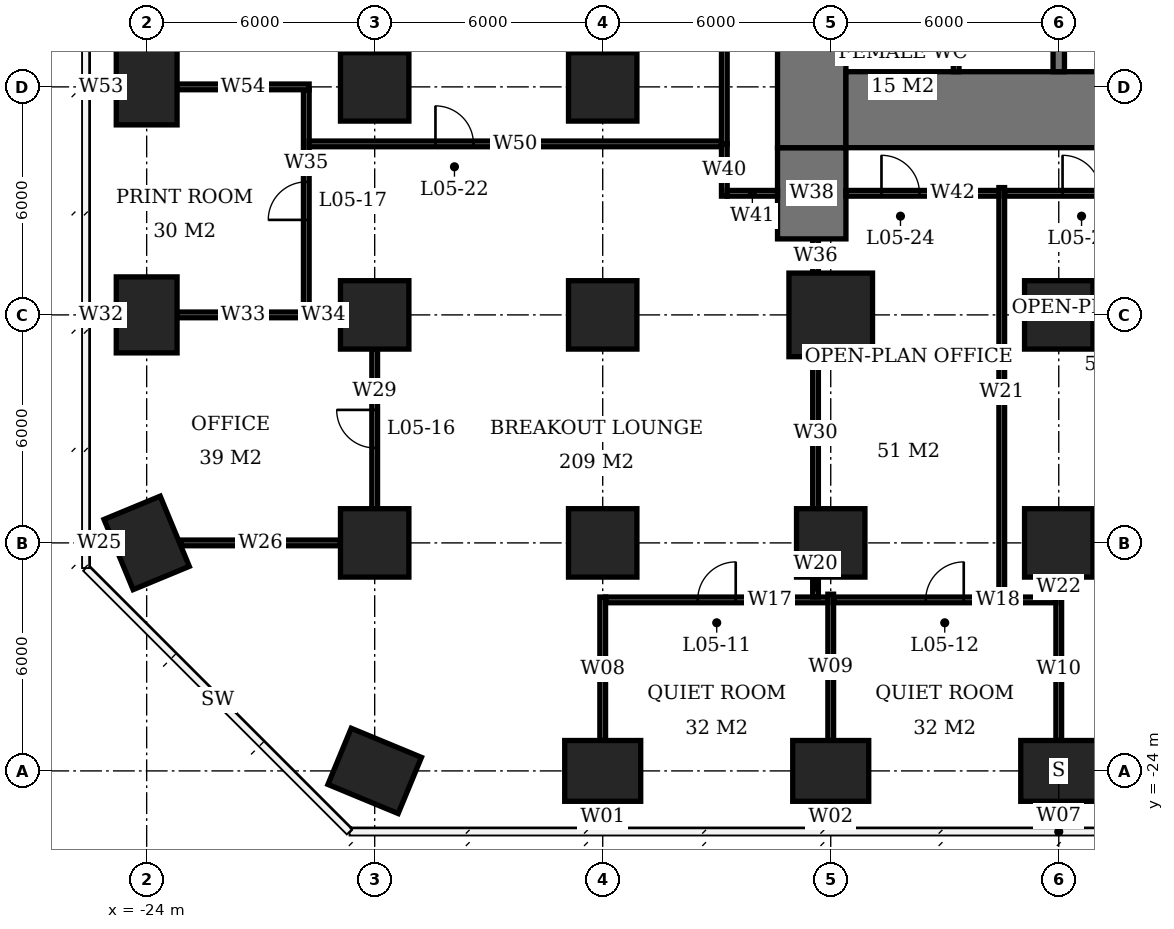
"""IFC4 building model, lengths in metres.
Left out: names, types, materials, properties, quantities, classifications, styles, units other than length and angle.
Written with IfcOpenShell. Run it as: python <this file> out.ifc"""

import sys

from ifc_helpers import new_model, si_unit, direction, frame, frame_2d, origin, origin_2d, place, context, subcontext, project, spatial, rectangle, extrude, element, fill, save


model = new_model("IFC4")
c1 = context("Model", 3, precision=1e-05, world=origin(), true_north=direction((0.0, 1.0)))
c2 = subcontext(c1, "Body", "Model", "MODEL_VIEW")
j1 = project(units=[si_unit("LENGTHUNIT", "METRE"), si_unit("PLANEANGLEUNIT", "RADIAN")], contexts=[c1])
p1 = place(None, origin())
s1 = spatial("IfcSite", under=j1, at=p1, CompositionType="ELEMENT")
p2 = place(p1, origin())
s2 = spatial("IfcBuilding", under=s1, at=p2, CompositionType="ELEMENT")
p3 = place(p2, frame((0.0, 0.0, 26.0)))
s3 = spatial("IfcBuildingStorey", under=s2, at=p3, CompositionType="ELEMENT", Elevation=26.0)
for number, where, z_axis, x_axis in (
    (1, (-24.0, -18.0, 0.0), (0.0, 0.0, 1.0), (-0.383, 0.924, 0.0)),
    (2, (-24.0, -12.0, 0.0), (0.0, 0.0, 1.0), (0.0, 1.0, 0.0)),
    (3, (-24.0, -6.0, 0.0), (0.0, 0.0, 1.0), (0.0, 1.0, 0.0)),
    (4, (-18.0, -24.0, 0.0), (0.0, 0.0, 1.0), (-0.924, 0.383, 0.0)),
):
    element("IfcColumn", number, at=place(p3, frame(where, z_axis=z_axis, x_axis=x_axis)), inside=s3, PredefinedType="COLUMN", context=c2, shape_type="SweptSolid", body=[
        extrude(rectangle(XDim=2.0, YDim=1.6, at=origin_2d()), origin(), (0.0, 0.0, 1.0), 3.9),
    ])
for number, where, z_axis, x_axis in (
    (5, (-18.0, -18.0, 0.0), (0.0, 0.0, 1.0), (1.0, 0.0, 0.0)),
    (6, (-18.0, -12.0, 0.0), (0.0, 0.0, 1.0), (1.0, 0.0, 0.0)),
    (7, (-18.0, -6.0, 0.0), (0.0, 0.0, 1.0), (1.0, 0.0, 0.0)),
):
    element("IfcColumn", number, at=place(p3, frame(where, z_axis=z_axis, x_axis=x_axis)), inside=s3, PredefinedType="COLUMN", context=c2, shape_type="SweptSolid", body=[
        extrude(rectangle(XDim=1.8, YDim=1.8, at=origin_2d()), origin(), (0.0, 0.0, 1.0), 3.9),
    ])
p4 = place(p3, frame((-12.0, -24.0, 0.0), z_axis=(0.0, 0.0, 1.0), x_axis=(1.0, 0.0, 0.0)))
e8 = element("IfcColumn", 8, at=p4, inside=s3, PredefinedType="COLUMN", context=c2, shape_type="SweptSolid", body=[
    extrude(rectangle(XDim=2.0, YDim=1.6, at=origin_2d()), origin(), (0.0, 0.0, 1.0), 3.9),
])
for number, where, z_axis, x_axis in (
    (9, (-12.0, -18.0, 0.0), (0.0, 0.0, 1.0), (1.0, 0.0, 0.0)),
    (10, (-12.0, -12.0, 0.0), (0.0, 0.0, 1.0), (1.0, 0.0, 0.0)),
    (11, (-12.0, -6.0, 0.0), (0.0, 0.0, 1.0), (1.0, 0.0, 0.0)),
):
    element("IfcColumn", number, at=place(p3, frame(where, z_axis=z_axis, x_axis=x_axis)), inside=s3, PredefinedType="COLUMN", context=c2, shape_type="SweptSolid", body=[
        extrude(rectangle(XDim=1.8, YDim=1.8, at=origin_2d()), origin(), (0.0, 0.0, 1.0), 3.9),
    ])
p5 = place(p3, frame((-6.0, -24.0, 0.0), z_axis=(0.0, 0.0, 1.0), x_axis=(1.0, 0.0, 0.0)))
e12 = element("IfcColumn", 12, at=p5, inside=s3, PredefinedType="COLUMN", context=c2, shape_type="SweptSolid", body=[
    extrude(rectangle(XDim=2.0, YDim=1.6, at=origin_2d()), origin(), (0.0, 0.0, 1.0), 3.9),
])
p6 = place(p3, frame((-6.0, -18.0, 0.0), z_axis=(0.0, 0.0, 1.0), x_axis=(1.0, 0.0, 0.0)))
e13 = element("IfcColumn", 13, at=p6, inside=s3, PredefinedType="COLUMN", context=c2, shape_type="SweptSolid", body=[
    extrude(rectangle(XDim=1.8, YDim=1.8, at=origin_2d()), origin(), (0.0, 0.0, 1.0), 3.9),
])
p7 = place(p3, frame((-6.0, -12.0, 0.0), z_axis=(0.0, 0.0, 1.0), x_axis=(1.0, 0.0, 0.0)))
e14 = element("IfcColumn", 14, at=p7, inside=s3, PredefinedType="COLUMN", context=c2, shape_type="SweptSolid", body=[
    extrude(rectangle(XDim=2.2, YDim=2.2, at=origin_2d()), origin(), (0.0, 0.0, 1.0), 3.9),
])
p8 = place(p3, frame((0.0, -24.0, 0.0), z_axis=(0.0, 0.0, 1.0), x_axis=(1.0, 0.0, 0.0)))
e15 = element("IfcColumn", 15, at=p8, inside=s3, PredefinedType="COLUMN", context=c2, shape_type="SweptSolid", body=[
    extrude(rectangle(XDim=2.0, YDim=1.6, at=origin_2d()), origin(), (0.0, 0.0, 1.0), 3.9),
])
for number, where, z_axis, x_axis in (
    (16, (0.0, -18.0, 0.0), (0.0, 0.0, 1.0), (1.0, 0.0, 0.0)),
    (17, (0.0, -12.0, 0.0), (0.0, 0.0, 1.0), (1.0, 0.0, 0.0)),
):
    element("IfcColumn", number, at=place(p3, frame(where, z_axis=z_axis, x_axis=x_axis)), inside=s3, PredefinedType="COLUMN", context=c2, shape_type="SweptSolid", body=[
        extrude(rectangle(XDim=1.8, YDim=1.8, at=origin_2d()), origin(), (0.0, 0.0, 1.0), 3.9),
    ])
p9 = place(p3, frame((-5.6, -6.6, 0.0), z_axis=(0.0, 0.0, 1.0), x_axis=(1.0, 0.0, 0.0)))
e18 = element("IfcWall", 18, at=p9, inside=s3, PredefinedType="SHEAR", context=c2, shape_type="SweptSolid", body=[
    extrude(rectangle(XDim=23.2, YDim=2.0, at=frame_2d((11.6, 0.0))), origin(), (0.0, 0.0, 1.0), 3.9),
])
p10 = place(p3, frame((-6.5, -7.6, 0.0), z_axis=(0.0, 0.0, 1.0), x_axis=(0.0, 1.0, 0.0)))
e19 = element("IfcWall", 19, at=p10, inside=s3, PredefinedType="SHEAR", context=c2, shape_type="SweptSolid", body=[
    extrude(rectangle(XDim=21.2, YDim=1.8, at=frame_2d((10.6, 0.0))), origin(), (0.0, 0.0, 1.0), 3.9),
])
p11 = place(p10, frame((7.8, 0.0, 0.0)))
e20 = element("IfcOpeningElement", 20, at=p11, cuts=e19, PredefinedType="OPENING", context=c2, shape_type="SweptSolid", body=[
    extrude(rectangle(XDim=1.8, YDim=2.4, at=frame_2d((0.9, 1.2))), frame((0.0, 0.91, 0.0), z_axis=(0.0, -1.0, 0.0), x_axis=(1.0, 0.0, 0.0)), (0.0, 0.0, 1.0), 1.82),
])
p12 = place(p3, frame((-6.5, -10.0, 0.0), z_axis=(0.0, 0.0, 1.0), x_axis=(0.0, 1.0, 0.0)))
e21 = element("IfcWall", 21, at=p12, inside=s3, PredefinedType="SHEAR", context=c2, shape_type="SweptSolid", body=[
    extrude(rectangle(XDim=2.4, YDim=1.8, at=frame_2d((1.2, 0.0))), origin(), (0.0, 0.0, 1.0), 3.9),
])
p13 = place(p3, frame((0.0, -5.6, 0.0), z_axis=(0.0, 0.0, 1.0), x_axis=(0.0, 1.0, 0.0)))
e22 = element("IfcWall", 22, at=p13, inside=s3, PredefinedType="SHEAR", context=c2, shape_type="SweptSolid", body=[
    extrude(rectangle(XDim=5.45, YDim=0.3, at=frame_2d((2.725, 0.0))), origin(), (0.0, 0.0, 1.0), 3.9),
])
p14 = place(p3, frame((-2.7, -5.6, 0.0), z_axis=(0.0, 0.0, 1.0), x_axis=(0.0, 1.0, 0.0)))
e23 = element("IfcWall", 23, at=p14, inside=s3, PredefinedType="PLUMBINGWALL", context=c2, shape_type="SweptSolid", body=[
    extrude(rectangle(XDim=5.45, YDim=0.15, at=frame_2d((2.725, 0.0))), origin(), (0.0, 0.0, 1.0), 3.65),
])
p15 = place(p3, frame((-11.925, -19.5, 0.0), z_axis=(0.0, 0.0, 1.0), x_axis=(1.0, 0.0, 0.0)))
e24 = element("IfcWall", 24, at=p15, inside=s3, PredefinedType="PARTITIONING", context=c2, shape_type="SweptSolid", body=[
    extrude(rectangle(XDim=5.85, YDim=0.15, at=frame_2d((2.925, 0.0))), origin(), (0.0, 0.0, 1.0), 3.65),
])
p16 = place(p15, frame((2.425, 0.0, 0.0)))
e25 = element("IfcOpeningElement", 25, at=p16, cuts=e24, PredefinedType="OPENING", context=c2, shape_type="SweptSolid", body=[
    extrude(rectangle(XDim=1.0, YDim=2.1, at=frame_2d((0.5, 1.05))), frame((0.0, 0.085, 0.0), z_axis=(0.0, -1.0, 0.0), x_axis=(1.0, 0.0, 0.0)), (0.0, 0.0, 1.0), 0.17),
])
p17 = place(p3, frame((-5.925, -19.5, 0.0), z_axis=(0.0, 0.0, 1.0), x_axis=(1.0, 0.0, 0.0)))
e26 = element("IfcWall", 26, at=p17, inside=s3, PredefinedType="PARTITIONING", context=c2, shape_type="SweptSolid", body=[
    extrude(rectangle(XDim=5.85, YDim=0.15, at=frame_2d((2.925, 0.0))), origin(), (0.0, 0.0, 1.0), 3.65),
])
p18 = place(p17, frame((2.425, 0.0, 0.0)))
e27 = element("IfcOpeningElement", 27, at=p18, cuts=e26, PredefinedType="OPENING", context=c2, shape_type="SweptSolid", body=[
    extrude(rectangle(XDim=1.0, YDim=2.1, at=frame_2d((0.5, 1.05))), frame((0.0, 0.085, 0.0), z_axis=(0.0, -1.0, 0.0), x_axis=(1.0, 0.0, 0.0)), (0.0, 0.0, 1.0), 0.17),
])
p19 = place(p3, frame((-25.6, -18.0, 0.0), z_axis=(0.0, 0.0, 1.0), x_axis=(1.0, 0.0, 0.0)))
e28 = element("IfcWall", 28, at=p19, inside=s3, PredefinedType="PARTITIONING", context=c2, shape_type="SweptSolid", body=[
    extrude(rectangle(XDim=0.703, YDim=0.15, at=frame_2d((0.352, 0.0))), origin(), (0.0, 0.0, 1.0), 3.65),
])
p20 = place(p3, frame((-23.103, -18.0, 0.0), z_axis=(0.0, 0.0, 1.0), x_axis=(1.0, 0.0, 0.0)))
e29 = element("IfcWall", 29, at=p20, inside=s3, PredefinedType="PARTITIONING", context=c2, shape_type="SweptSolid", body=[
    extrude(rectangle(XDim=4.203, YDim=0.15, at=frame_2d((2.102, 0.0))), origin(), (0.0, 0.0, 1.0), 3.65),
])
p21 = place(p3, frame((0.9, -18.0, 0.0), z_axis=(0.0, 0.0, 1.0), x_axis=(1.0, 0.0, 0.0)))
e30 = element("IfcWall", 30, at=p21, inside=s3, PredefinedType="PARTITIONING", context=c2, shape_type="SweptSolid", body=[
    extrude(rectangle(XDim=4.2, YDim=0.15, at=frame_2d((2.1, 0.0))), origin(), (0.0, 0.0, 1.0), 3.65),
])
p22 = place(p21, frame((1.6, 0.0, 0.0)))
e31 = element("IfcOpeningElement", 31, at=p22, cuts=e30, PredefinedType="OPENING", context=c2, shape_type="SweptSolid", body=[
    extrude(rectangle(XDim=1.0, YDim=2.1, at=frame_2d((0.5, 1.05))), frame((0.0, 0.085, 0.0), z_axis=(0.0, -1.0, 0.0), x_axis=(1.0, 0.0, 0.0)), (0.0, 0.0, 1.0), 0.17),
])
p23 = place(p3, frame((-25.6, -12.0, 0.0), z_axis=(0.0, 0.0, 1.0), x_axis=(1.0, 0.0, 0.0)))
e32 = element("IfcWall", 32, at=p23, inside=s3, PredefinedType="PARTITIONING", context=c2, shape_type="SweptSolid", body=[
    extrude(rectangle(XDim=0.8, YDim=0.15, at=frame_2d((0.4, 0.0))), origin(), (0.0, 0.0, 1.0), 3.65),
])
p24 = place(p3, frame((-23.2, -12.0, 0.0), z_axis=(0.0, 0.0, 1.0), x_axis=(1.0, 0.0, 0.0)))
e33 = element("IfcWall", 33, at=p24, inside=s3, PredefinedType="PARTITIONING", context=c2, shape_type="SweptSolid", body=[
    extrude(rectangle(XDim=3.475, YDim=0.15, at=frame_2d((1.737, 0.0))), origin(), (0.0, 0.0, 1.0), 3.65),
])
p25 = place(p3, frame((-19.8, -12.0, 0.0), z_axis=(0.0, 0.0, 1.0), x_axis=(1.0, 0.0, 0.0)))
e34 = element("IfcWall", 34, at=p25, inside=s3, PredefinedType="PARTITIONING", context=c2, shape_type="SweptSolid", body=[
    extrude(rectangle(XDim=0.9, YDim=0.15, at=frame_2d((0.45, 0.0))), origin(), (0.0, 0.0, 1.0), 3.65),
])
p26 = place(p3, frame((-25.6, -6.0, 0.0), z_axis=(0.0, 0.0, 1.0), x_axis=(1.0, 0.0, 0.0)))
e35 = element("IfcWall", 35, at=p26, inside=s3, PredefinedType="PARTITIONING", context=c2, shape_type="SweptSolid", body=[
    extrude(rectangle(XDim=0.8, YDim=0.15, at=frame_2d((0.4, 0.0))), origin(), (0.0, 0.0, 1.0), 3.65),
])
p27 = place(p3, frame((-23.2, -6.0, 0.0), z_axis=(0.0, 0.0, 1.0), x_axis=(1.0, 0.0, 0.0)))
e36 = element("IfcWall", 36, at=p27, inside=s3, PredefinedType="PARTITIONING", context=c2, shape_type="SweptSolid", body=[
    extrude(rectangle(XDim=3.475, YDim=0.15, at=frame_2d((1.737, 0.0))), origin(), (0.0, 0.0, 1.0), 3.65),
])
p28 = place(p3, frame((-19.8, -11.925, 0.0), z_axis=(0.0, 0.0, 1.0), x_axis=(0.0, 1.0, 0.0)))
e37 = element("IfcWall", 37, at=p28, inside=s3, PredefinedType="PARTITIONING", context=c2, shape_type="SweptSolid", body=[
    extrude(rectangle(XDim=5.85, YDim=0.15, at=frame_2d((2.925, 0.0))), origin(), (0.0, 0.0, 1.0), 3.65),
])
p29 = place(p28, frame((2.425, 0.0, 0.0)))
e38 = element("IfcOpeningElement", 38, at=p29, cuts=e37, PredefinedType="OPENING", context=c2, shape_type="SweptSolid", body=[
    extrude(rectangle(XDim=1.0, YDim=2.1, at=frame_2d((0.5, 1.05))), frame((0.0, 0.085, 0.0), z_axis=(0.0, -1.0, 0.0), x_axis=(1.0, 0.0, 0.0)), (0.0, 0.0, 1.0), 0.17),
])
p30 = place(p3, frame((-18.0, -17.1, 0.0), z_axis=(0.0, 0.0, 1.0), x_axis=(0.0, 1.0, 0.0)))
e39 = element("IfcWall", 39, at=p30, inside=s3, PredefinedType="PARTITIONING", context=c2, shape_type="SweptSolid", body=[
    extrude(rectangle(XDim=4.2, YDim=0.15, at=frame_2d((2.1, 0.0))), origin(), (0.0, 0.0, 1.0), 3.65),
])
p31 = place(p30, frame((1.6, 0.0, 0.0)))
e40 = element("IfcOpeningElement", 40, at=p31, cuts=e39, PredefinedType="OPENING", context=c2, shape_type="SweptSolid", body=[
    extrude(rectangle(XDim=1.0, YDim=2.1, at=frame_2d((0.5, 1.05))), frame((0.0, 0.085, 0.0), z_axis=(0.0, -1.0, 0.0), x_axis=(1.0, 0.0, 0.0)), (0.0, 0.0, 1.0), 0.17),
])
p32 = place(p3, frame((-12.0, -25.6, 0.0), z_axis=(0.0, 0.0, 1.0), x_axis=(0.0, 1.0, 0.0)))
e41 = element("IfcWall", 41, at=p32, inside=s3, PredefinedType="PARTITIONING", context=c2, shape_type="SweptSolid", body=[
    extrude(rectangle(XDim=0.8, YDim=0.15, at=frame_2d((0.4, 0.0))), origin(), (0.0, 0.0, 1.0), 3.65),
])
p33 = place(p3, frame((-12.0, -23.2, 0.0), z_axis=(0.0, 0.0, 1.0), x_axis=(0.0, 1.0, 0.0)))
e42 = element("IfcWall", 42, at=p33, inside=s3, PredefinedType="PARTITIONING", context=c2, shape_type="SweptSolid", body=[
    extrude(rectangle(XDim=3.775, YDim=0.15, at=frame_2d((1.887, 0.0))), origin(), (0.0, 0.0, 1.0), 3.65),
])
p34 = place(p3, frame((-6.0, -25.6, 0.0), z_axis=(0.0, 0.0, 1.0), x_axis=(0.0, 1.0, 0.0)))
e43 = element("IfcWall", 43, at=p34, inside=s3, PredefinedType="PARTITIONING", context=c2, shape_type="SweptSolid", body=[
    extrude(rectangle(XDim=0.8, YDim=0.15, at=frame_2d((0.4, 0.0))), origin(), (0.0, 0.0, 1.0), 3.65),
])
p35 = place(p3, frame((-6.0, -23.2, 0.0), z_axis=(0.0, 0.0, 1.0), x_axis=(0.0, 1.0, 0.0)))
e44 = element("IfcWall", 44, at=p35, inside=s3, PredefinedType="PARTITIONING", context=c2, shape_type="SweptSolid", body=[
    extrude(rectangle(XDim=3.85, YDim=0.15, at=frame_2d((1.925, 0.0))), origin(), (0.0, 0.0, 1.0), 3.65),
])
p36 = place(p3, frame((0.0, -25.55, 0.0), z_axis=(0.0, 0.0, 1.0), x_axis=(0.0, 1.0, 0.0)))
e45 = element("IfcWall", 45, at=p36, inside=s3, PredefinedType="PARTITIONING", context=c2, shape_type="SweptSolid", body=[
    extrude(rectangle(XDim=0.75, YDim=0.15, at=frame_2d((0.375, 0.0))), origin(), (0.0, 0.0, 1.0), 3.65),
])
p37 = place(p3, frame((0.0, -23.2, 0.0), z_axis=(0.0, 0.0, 1.0), x_axis=(0.0, 1.0, 0.0)))
e46 = element("IfcWall", 46, at=p37, inside=s3, PredefinedType="PARTITIONING", context=c2, shape_type="SweptSolid", body=[
    extrude(rectangle(XDim=3.775, YDim=0.15, at=frame_2d((1.887, 0.0))), origin(), (0.0, 0.0, 1.0), 3.65),
])
p38 = place(p3, frame((0.0, -19.425, 0.0), z_axis=(0.0, 0.0, 1.0), x_axis=(0.0, 1.0, 0.0)))
e47 = element("IfcWall", 47, at=p38, inside=s3, PredefinedType="PARTITIONING", context=c2, shape_type="SweptSolid", body=[
    extrude(rectangle(XDim=0.525, YDim=0.15, at=frame_2d((0.263, 0.0))), origin(), (0.0, 0.0, 1.0), 3.65),
])
p39 = place(p3, frame((-19.725, -7.5, 0.0), z_axis=(0.0, 0.0, 1.0), x_axis=(1.0, 0.0, 0.0)))
e48 = element("IfcWall", 48, at=p39, inside=s3, PredefinedType="PARTITIONING", context=c2, shape_type="SweptSolid", body=[
    extrude(rectangle(XDim=10.85, YDim=0.15, at=frame_2d((5.425, 0.0))), origin(), (0.0, 0.0, 1.0), 3.65),
])
p40 = place(p39, frame((3.324, 0.0, 0.0)))
e49 = element("IfcOpeningElement", 49, at=p40, cuts=e48, PredefinedType="OPENING", context=c2, shape_type="SweptSolid", body=[
    extrude(rectangle(XDim=1.0, YDim=2.1, at=frame_2d((0.5, 1.05))), frame((0.0, 0.085, 0.0), z_axis=(0.0, -1.0, 0.0), x_axis=(1.0, 0.0, 0.0)), (0.0, 0.0, 1.0), 0.17),
])
p41 = place(p3, frame((-8.8, -8.875, 0.0), z_axis=(0.0, 0.0, 1.0), x_axis=(0.0, 1.0, 0.0)))
e50 = element("IfcWall", 50, at=p41, inside=s3, PredefinedType="PARTITIONING", context=c2, shape_type="SweptSolid", body=[
    extrude(rectangle(XDim=1.375, YDim=0.15, at=frame_2d((0.688, 0.0))), origin(), (0.0, 0.0, 1.0), 3.65),
])
p42 = place(p3, frame((-8.725, -8.8, 0.0), z_axis=(0.0, 0.0, 1.0), x_axis=(1.0, 0.0, 0.0)))
e51 = element("IfcWall", 51, at=p42, inside=s3, PredefinedType="PARTITIONING", context=c2, shape_type="SweptSolid", body=[
    extrude(rectangle(XDim=1.325, YDim=0.15, at=frame_2d((0.663, 0.0))), origin(), (0.0, 0.0, 1.0), 3.65),
])
p43 = place(p3, frame((-8.8, -7.5, 0.0), z_axis=(0.0, 0.0, 1.0), x_axis=(0.0, 1.0, 0.0)))
e52 = element("IfcWall", 52, at=p43, inside=s3, PredefinedType="PARTITIONING", context=c2, shape_type="SweptSolid", body=[
    extrude(rectangle(XDim=8.925, YDim=0.15, at=frame_2d((4.462, 0.0))), origin(), (0.0, 0.0, 1.0), 3.65),
])
p44 = place(p43, frame((2.65, 0.0, 0.0)))
e53 = element("IfcOpeningElement", 53, at=p44, cuts=e52, PredefinedType="OPENING", context=c2, shape_type="SweptSolid", body=[
    extrude(rectangle(XDim=1.0, YDim=2.1, at=frame_2d((0.5, 1.05))), frame((0.0, 0.085, 0.0), z_axis=(0.0, -1.0, 0.0), x_axis=(1.0, 0.0, 0.0)), (0.0, 0.0, 1.0), 0.17),
])
p45 = place(p3, frame((-6.4, -19.425, 0.0), z_axis=(0.0, 0.0, 1.0), x_axis=(0.0, 1.0, 0.0)))
e54 = element("IfcWall", 54, at=p45, inside=s3, PredefinedType="PARTITIONING", context=c2, shape_type="SweptSolid", body=[
    extrude(rectangle(XDim=0.525, YDim=0.15, at=frame_2d((0.263, 0.0))), origin(), (0.0, 0.0, 1.0), 3.65),
])
p46 = place(p3, frame((-6.4, -17.1, 0.0), z_axis=(0.0, 0.0, 1.0), x_axis=(0.0, 1.0, 0.0)))
e55 = element("IfcWall", 55, at=p46, inside=s3, PredefinedType="PARTITIONING", context=c2, shape_type="SweptSolid", body=[
    extrude(rectangle(XDim=4.0, YDim=0.15, at=frame_2d((2.0, 0.0))), origin(), (0.0, 0.0, 1.0), 3.65),
])
p47 = place(p3, frame((-6.4, -10.9, 0.0), z_axis=(0.0, 0.0, 1.0), x_axis=(0.0, 1.0, 0.0)))
e56 = element("IfcWall", 56, at=p47, inside=s3, PredefinedType="PARTITIONING", context=c2, shape_type="SweptSolid", body=[
    extrude(rectangle(XDim=0.9, YDim=0.15, at=frame_2d((0.45, 0.0))), origin(), (0.0, 0.0, 1.0), 3.65),
])
p48 = place(p3, frame((-5.6, -8.8, 0.0), z_axis=(0.0, 0.0, 1.0), x_axis=(1.0, 0.0, 0.0)))
e57 = element("IfcWall", 57, at=p48, inside=s3, PredefinedType="PARTITIONING", context=c2, shape_type="SweptSolid", body=[
    extrude(rectangle(XDim=4.025, YDim=0.15, at=frame_2d((2.013, 0.0))), origin(), (0.0, 0.0, 1.0), 3.65),
])
p49 = place(p48, frame((0.935, 0.0, 0.0)))
e58 = element("IfcOpeningElement", 58, at=p49, cuts=e57, PredefinedType="OPENING", context=c2, shape_type="SweptSolid", body=[
    extrude(rectangle(XDim=1.0, YDim=2.1, at=frame_2d((0.5, 1.05))), frame((0.0, 0.085, 0.0), z_axis=(0.0, -1.0, 0.0), x_axis=(1.0, 0.0, 0.0)), (0.0, 0.0, 1.0), 0.17),
])
p50 = place(p3, frame((-1.5, -19.425, 0.0), z_axis=(0.0, 0.0, 1.0), x_axis=(0.0, 1.0, 0.0)))
e59 = element("IfcWall", 59, at=p50, inside=s3, PredefinedType="PARTITIONING", context=c2, shape_type="SweptSolid", body=[
    extrude(rectangle(XDim=10.775, YDim=0.15, at=frame_2d((5.388, 0.0))), origin(), (0.0, 0.0, 1.0), 3.65),
])
p51 = place(p3, frame((-1.425, -8.8, 0.0), z_axis=(0.0, 0.0, 1.0), x_axis=(1.0, 0.0, 0.0)))
e60 = element("IfcWall", 60, at=p51, inside=s3, PredefinedType="PARTITIONING", context=c2, shape_type="SweptSolid", body=[
    extrude(rectangle(XDim=5.85, YDim=0.15, at=frame_2d((2.925, 0.0))), origin(), (0.0, 0.0, 1.0), 3.65),
])
p52 = place(p51, frame((1.525, 0.0, 0.0)))
e61 = element("IfcOpeningElement", 61, at=p52, cuts=e60, PredefinedType="OPENING", context=c2, shape_type="SweptSolid", body=[
    extrude(rectangle(XDim=1.0, YDim=2.1, at=frame_2d((0.5, 1.05))), frame((0.0, 0.085, 0.0), z_axis=(0.0, -1.0, 0.0), x_axis=(1.0, 0.0, 0.0)), (0.0, 0.0, 1.0), 0.17),
])
p53 = place(p16, origin())
e62 = element("IfcDoor", 62, at=p53, inside=s3, OperationType="SINGLE_SWING_RIGHT", PredefinedType="DOOR", context=c2, shape_type="SweptSolid", body=[
    extrude(rectangle(XDim=1.0, YDim=2.1, at=frame_2d((0.5, 1.05))), frame((0.0, 0.025, 0.0), z_axis=(0.0, -1.0, 0.0), x_axis=(1.0, 0.0, 0.0)), (0.0, 0.0, 1.0), 0.05),
])
fill(e25, e62)
p54 = place(p18, origin())
e63 = element("IfcDoor", 63, at=p54, inside=s3, OperationType="SINGLE_SWING_RIGHT", PredefinedType="DOOR", context=c2, shape_type="SweptSolid", body=[
    extrude(rectangle(XDim=1.0, YDim=2.1, at=frame_2d((0.5, 1.05))), frame((0.0, 0.025, 0.0), z_axis=(0.0, -1.0, 0.0), x_axis=(1.0, 0.0, 0.0)), (0.0, 0.0, 1.0), 0.05),
])
fill(e27, e63)
p55 = place(p31, origin())
e64 = element("IfcDoor", 64, at=p55, inside=s3, OperationType="SINGLE_SWING_RIGHT", PredefinedType="DOOR", context=c2, shape_type="SweptSolid", body=[
    extrude(rectangle(XDim=1.0, YDim=2.1, at=frame_2d((0.5, 1.05))), frame((0.0, 0.025, 0.0), z_axis=(0.0, -1.0, 0.0), x_axis=(1.0, 0.0, 0.0)), (0.0, 0.0, 1.0), 0.05),
])
fill(e40, e64)
p56 = place(p29, origin())
e65 = element("IfcDoor", 65, at=p56, inside=s3, OperationType="SINGLE_SWING_LEFT", PredefinedType="DOOR", context=c2, shape_type="SweptSolid", body=[
    extrude(rectangle(XDim=1.0, YDim=2.1, at=frame_2d((0.5, 1.05))), frame((0.0, 0.025, 0.0), z_axis=(0.0, -1.0, 0.0), x_axis=(1.0, 0.0, 0.0)), (0.0, 0.0, 1.0), 0.05),
])
fill(e38, e65)
p57 = place(p40, origin())
e66 = element("IfcDoor", 66, at=p57, inside=s3, OperationType="SINGLE_SWING_LEFT", PredefinedType="DOOR", context=c2, shape_type="SweptSolid", body=[
    extrude(rectangle(XDim=1.0, YDim=2.1, at=frame_2d((0.5, 1.05))), frame((0.0, 0.025, 0.0), z_axis=(0.0, -1.0, 0.0), x_axis=(1.0, 0.0, 0.0)), (0.0, 0.0, 1.0), 0.05),
])
fill(e49, e66)
p58 = place(p49, origin())
e67 = element("IfcDoor", 67, at=p58, inside=s3, OperationType="SINGLE_SWING_LEFT", PredefinedType="DOOR", context=c2, shape_type="SweptSolid", body=[
    extrude(rectangle(XDim=1.0, YDim=2.1, at=frame_2d((0.5, 1.05))), frame((0.0, 0.025, 0.0), z_axis=(0.0, -1.0, 0.0), x_axis=(1.0, 0.0, 0.0)), (0.0, 0.0, 1.0), 0.05),
])
fill(e58, e67)
p59 = place(p52, origin())
e68 = element("IfcDoor", 68, at=p59, inside=s3, OperationType="SINGLE_SWING_LEFT", PredefinedType="DOOR", context=c2, shape_type="SweptSolid", body=[
    extrude(rectangle(XDim=1.0, YDim=2.1, at=frame_2d((0.5, 1.05))), frame((0.0, 0.025, 0.0), z_axis=(0.0, -1.0, 0.0), x_axis=(1.0, 0.0, 0.0)), (0.0, 0.0, 1.0), 0.05),
])
fill(e61, e68)
save(model, sys.argv[1])
